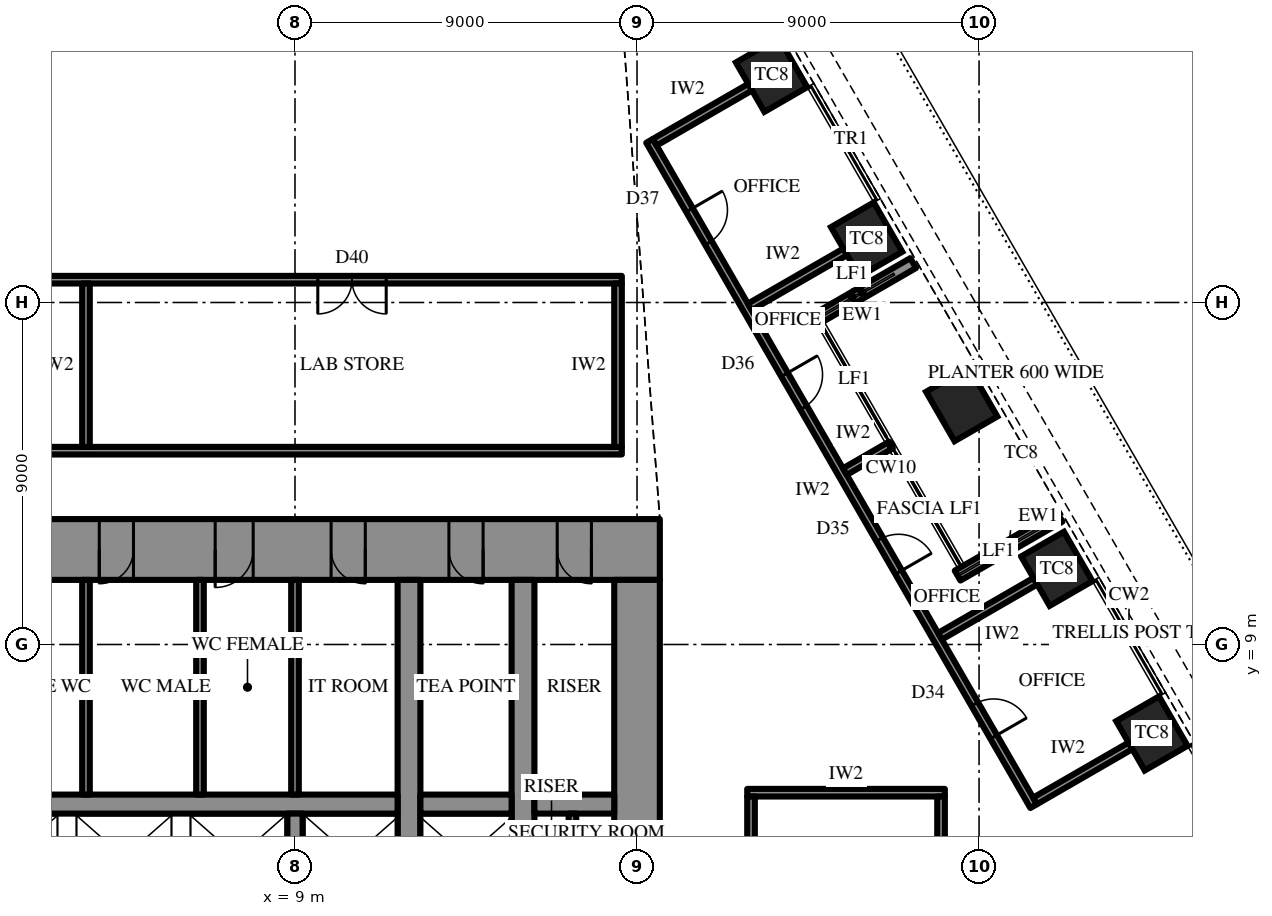
"""IFC4 building model, lengths in metres.
Left out: names, types, materials, properties, quantities, classifications, styles, units other than length and angle.
Written with IfcOpenShell. Run it as: python <this file> out.ifc"""

import sys

from ifc_helpers import new_model, si_unit, direction, frame, frame_2d, origin, origin_2d, place, context, subcontext, project, spatial, rectangle, extrude, element, fill, save


model = new_model("IFC4")
c1 = context("Model", 3, precision=1e-05, world=origin(), true_north=direction((0.0, 1.0)))
c2 = subcontext(c1, "Body", "Model", "MODEL_VIEW")
j1 = project(units=[si_unit("LENGTHUNIT", "METRE"), si_unit("PLANEANGLEUNIT", "RADIAN")], contexts=[c1])
p1 = place(None, origin())
s1 = spatial("IfcSite", under=j1, at=p1, CompositionType="ELEMENT")
p2 = place(p1, origin())
s2 = spatial("IfcBuilding", under=s1, at=p2, CompositionType="ELEMENT")
p3 = place(p2, frame((0.0, 0.0, 195.1)))
s3 = spatial("IfcBuildingStorey", under=s2, at=p3, CompositionType="ELEMENT", Elevation=195.1)
for number, where, z_axis, x_axis in (
    (1, (31.547, 6.658, 0.0), (0.0, 0.0, 1.0), (-0.5, 0.866, 0.0)),
    (2, (29.045, 10.992, 0.0), (0.0, 0.0, 1.0), (-0.5, 0.866, 0.0)),
    (3, (26.544, 15.325, 0.0), (0.0, 0.0, 1.0), (-0.5, 0.866, 0.0)),
    (4, (24.042, 19.658, 0.0), (0.0, 0.0, 1.0), (-0.5, 0.866, 0.0)),
    (5, (21.54, 23.992, 0.0), (0.0, 0.0, 1.0), (-0.5, 0.866, 0.0)),
):
    element("IfcColumn", number, at=place(p3, frame(where, z_axis=z_axis, x_axis=x_axis)), inside=s3, PredefinedType="COLUMN", context=c2, shape_type="SweptSolid", body=[
        extrude(rectangle(XDim=1.5, YDim=1.3, at=origin_2d()), origin(), (0.0, 0.0, 1.0), 4.2),
    ])
p4 = place(p3, frame((-18.6, 11.5, 0.0), z_axis=(0.0, 0.0, 1.0), x_axis=(1.0, 0.0, 0.0)))
e6 = element("IfcWall", 6, at=p4, inside=s3, PredefinedType="SHEAR", context=c2, shape_type="SweptSolid", body=[
    extrude(rectangle(XDim=37.2, YDim=1.6, at=frame_2d((18.6, 0.0))), origin(), (0.0, 0.0, 1.0), 4.2),
])
p5 = place(p4, frame((19.45, 0.0, 0.0)))
e7 = element("IfcOpeningElement", 7, at=p5, cuts=e6, PredefinedType="OPENING", context=c2, shape_type="SweptSolid", body=[
    extrude(rectangle(XDim=0.9, YDim=2.2, at=frame_2d((0.45, 1.1))), frame((0.0, 0.81, 0.0), z_axis=(0.0, -1.0, 0.0), x_axis=(1.0, 0.0, 0.0)), (0.0, 0.0, 1.0), 1.62),
])
p6 = place(p4, frame((22.45, 0.0, 0.0)))
e8 = element("IfcOpeningElement", 8, at=p6, cuts=e6, PredefinedType="OPENING", context=c2, shape_type="SweptSolid", body=[
    extrude(rectangle(XDim=0.9, YDim=2.2, at=frame_2d((0.45, 1.1))), frame((0.0, 0.81, 0.0), z_axis=(0.0, -1.0, 0.0), x_axis=(1.0, 0.0, 0.0)), (0.0, 0.0, 1.0), 1.62),
])
p7 = place(p4, frame((25.5, 0.0, 0.0)))
e9 = element("IfcOpeningElement", 9, at=p7, cuts=e6, PredefinedType="OPENING", context=c2, shape_type="SweptSolid", body=[
    extrude(rectangle(XDim=1.0, YDim=2.2, at=frame_2d((0.5, 1.1))), frame((0.0, 0.81, 0.0), z_axis=(0.0, -1.0, 0.0), x_axis=(1.0, 0.0, 0.0)), (0.0, 0.0, 1.0), 1.62),
])
p8 = place(p4, frame((1.8, 0.0, 0.0)))
e10 = element("IfcOpeningElement", 10, at=p8, cuts=e6, PredefinedType="OPENING", context=c2, shape_type="SweptSolid", body=[
    extrude(rectangle(XDim=0.9, YDim=2.2, at=frame_2d((0.45, 1.1))), frame((0.0, 0.81, 0.0), z_axis=(0.0, -1.0, 0.0), x_axis=(1.0, 0.0, 0.0)), (0.0, 0.0, 1.0), 1.62),
])
p9 = place(p4, frame((4.65, 0.0, 0.0)))
e11 = element("IfcOpeningElement", 11, at=p9, cuts=e6, PredefinedType="OPENING", context=c2, shape_type="SweptSolid", body=[
    extrude(rectangle(XDim=0.9, YDim=2.2, at=frame_2d((0.45, 1.1))), frame((0.0, 0.81, 0.0), z_axis=(0.0, -1.0, 0.0), x_axis=(1.0, 0.0, 0.0)), (0.0, 0.0, 1.0), 1.62),
])
p10 = place(p4, frame((7.75, 0.0, 0.0)))
e12 = element("IfcOpeningElement", 12, at=p10, cuts=e6, PredefinedType="OPENING", context=c2, shape_type="SweptSolid", body=[
    extrude(rectangle(XDim=0.9, YDim=2.2, at=frame_2d((0.45, 1.1))), frame((0.0, 0.81, 0.0), z_axis=(0.0, -1.0, 0.0), x_axis=(1.0, 0.0, 0.0)), (0.0, 0.0, 1.0), 1.62),
])
p11 = place(p4, frame((28.55, 0.0, 0.0)))
e13 = element("IfcOpeningElement", 13, at=p11, cuts=e6, PredefinedType="OPENING", context=c2, shape_type="SweptSolid", body=[
    extrude(rectangle(XDim=0.9, YDim=2.2, at=frame_2d((0.45, 1.1))), frame((0.0, 0.81, 0.0), z_axis=(0.0, -1.0, 0.0), x_axis=(1.0, 0.0, 0.0)), (0.0, 0.0, 1.0), 1.62),
])
p12 = place(p4, frame((31.65, 0.0, 0.0)))
e14 = element("IfcOpeningElement", 14, at=p12, cuts=e6, PredefinedType="OPENING", context=c2, shape_type="SweptSolid", body=[
    extrude(rectangle(XDim=0.9, YDim=2.2, at=frame_2d((0.45, 1.1))), frame((0.0, 0.81, 0.0), z_axis=(0.0, -1.0, 0.0), x_axis=(1.0, 0.0, 0.0)), (0.0, 0.0, 1.0), 1.62),
])
p13 = place(p4, frame((34.5, 0.0, 0.0)))
e15 = element("IfcOpeningElement", 15, at=p13, cuts=e6, PredefinedType="OPENING", context=c2, shape_type="SweptSolid", body=[
    extrude(rectangle(XDim=0.9, YDim=2.2, at=frame_2d((0.45, 1.1))), frame((0.0, 0.81, 0.0), z_axis=(0.0, -1.0, 0.0), x_axis=(1.0, 0.0, 0.0)), (0.0, 0.0, 1.0), 1.62),
])
p14 = place(p3, frame((18.0, -10.7, 0.0), z_axis=(0.0, 0.0, 1.0), x_axis=(0.0, 1.0, 0.0)))
e16 = element("IfcWall", 16, at=p14, inside=s3, PredefinedType="SHEAR", context=c2, shape_type="SweptSolid", body=[
    extrude(rectangle(XDim=21.4, YDim=1.2, at=frame_2d((10.7, 0.0))), origin(), (0.0, 0.0, 1.0), 4.2),
])
p15 = place(p14, frame((9.8, 0.0, 0.0)))
e17 = element("IfcOpeningElement", 17, at=p15, cuts=e16, PredefinedType="OPENING", context=c2, shape_type="SweptSolid", body=[
    extrude(rectangle(XDim=1.8, YDim=2.4, at=frame_2d((0.9, 1.2))), frame((0.0, 0.61, 0.0), z_axis=(0.0, -1.0, 0.0), x_axis=(1.0, 0.0, 0.0)), (0.0, 0.0, 1.0), 1.22),
])
p16 = place(p3, frame((12.0, -10.7, 0.0), z_axis=(0.0, 0.0, 1.0), x_axis=(0.0, 1.0, 0.0)))
e18 = element("IfcWall", 18, at=p16, inside=s3, PredefinedType="SHEAR", context=c2, shape_type="SweptSolid", body=[
    extrude(rectangle(XDim=21.4, YDim=0.6, at=frame_2d((10.7, 0.0))), origin(), (0.0, 0.0, 1.0), 4.2),
])
p17 = place(p16, frame((9.8, 0.0, 0.0)))
e19 = element("IfcOpeningElement", 19, at=p17, cuts=e18, PredefinedType="OPENING", context=c2, shape_type="SweptSolid", body=[
    extrude(rectangle(XDim=1.8, YDim=2.4, at=frame_2d((0.9, 1.2))), frame((0.0, 0.31, 0.0), z_axis=(0.0, -1.0, 0.0), x_axis=(1.0, 0.0, 0.0)), (0.0, 0.0, 1.0), 0.62),
])
p18 = place(p3, frame((15.0, -10.7, 0.0), z_axis=(0.0, 0.0, 1.0), x_axis=(0.0, 1.0, 0.0)))
e20 = element("IfcWall", 20, at=p18, inside=s3, PredefinedType="SHEAR", context=c2, shape_type="SweptSolid", body=[
    extrude(rectangle(XDim=21.4, YDim=0.6, at=frame_2d((10.7, 0.0))), origin(), (0.0, 0.0, 1.0), 4.2),
])
p19 = place(p18, frame((9.8, 0.0, 0.0)))
e21 = element("IfcOpeningElement", 21, at=p19, cuts=e20, PredefinedType="OPENING", context=c2, shape_type="SweptSolid", body=[
    extrude(rectangle(XDim=1.8, YDim=2.4, at=frame_2d((0.9, 1.2))), frame((0.0, 0.31, 0.0), z_axis=(0.0, -1.0, 0.0), x_axis=(1.0, 0.0, 0.0)), (0.0, 0.0, 1.0), 0.62),
])
p20 = place(p3, frame((-11.7, 4.8, 0.0), z_axis=(0.0, 0.0, 1.0), x_axis=(1.0, 0.0, 0.0)))
e22 = element("IfcWall", 22, at=p20, inside=s3, PredefinedType="SHEAR", context=c2, shape_type="SweptSolid", body=[
    extrude(rectangle(XDim=23.4, YDim=0.5, at=frame_2d((11.7, 0.0))), origin(), (0.0, 0.0, 1.0), 4.2),
])
p21 = place(p20, frame((6.6, 0.0, 0.0)))
e23 = element("IfcOpeningElement", 23, at=p21, cuts=e22, PredefinedType="OPENING", context=c2, shape_type="SweptSolid", body=[
    extrude(rectangle(XDim=1.2, YDim=2.2, at=frame_2d((0.6, 1.1))), frame((0.0, 0.26, 0.0), z_axis=(0.0, -1.0, 0.0), x_axis=(1.0, 0.0, 0.0)), (0.0, 0.0, 1.0), 0.52),
])
p22 = place(p20, frame((3.6, 0.0, 0.0)))
e24 = element("IfcOpeningElement", 24, at=p22, cuts=e22, PredefinedType="OPENING", context=c2, shape_type="SweptSolid", body=[
    extrude(rectangle(XDim=1.2, YDim=2.2, at=frame_2d((0.6, 1.1))), frame((0.0, 0.26, 0.0), z_axis=(0.0, -1.0, 0.0), x_axis=(1.0, 0.0, 0.0)), (0.0, 0.0, 1.0), 0.52),
])
p23 = place(p3, frame((12.3, 4.8, 0.0), z_axis=(0.0, 0.0, 1.0), x_axis=(1.0, 0.0, 0.0)))
e25 = element("IfcWall", 25, at=p23, inside=s3, PredefinedType="SHEAR", context=c2, shape_type="SweptSolid", body=[
    extrude(rectangle(XDim=2.4, YDim=0.5, at=frame_2d((1.2, 0.0))), origin(), (0.0, 0.0, 1.0), 4.2),
])
p24 = place(p3, frame((15.3, 4.8, 0.0), z_axis=(0.0, 0.0, 1.0), x_axis=(1.0, 0.0, 0.0)))
e26 = element("IfcWall", 26, at=p24, inside=s3, PredefinedType="SHEAR", context=c2, shape_type="SweptSolid", body=[
    extrude(rectangle(XDim=2.1, YDim=0.5, at=frame_2d((1.05, 0.0))), origin(), (0.0, 0.0, 1.0), 4.2),
])
p25 = place(p3, frame((9.0, 2.25, 0.0), z_axis=(0.0, 0.0, 1.0), x_axis=(0.0, 1.0, 0.0)))
e27 = element("IfcWall", 27, at=p25, inside=s3, PredefinedType="SHEAR", context=c2, shape_type="SweptSolid", body=[
    extrude(rectangle(XDim=2.3, YDim=0.4, at=frame_2d((1.15, 0.0))), origin(), (0.0, 0.0, 1.0), 4.2),
])
p26 = place(p3, frame((29.12, 12.363, 0.0), z_axis=(0.0, 0.0, 1.0), x_axis=(-0.86602952684, -0.49999285859, 0.0)))
e28 = element("IfcWall", 28, at=p26, inside=s3, PredefinedType="SOLIDWALL", context=c2, shape_type="SweptSolid", body=[
    extrude(rectangle(XDim=3.1, YDim=0.3, at=frame_2d((1.55, 0.0))), origin(), (0.0, 0.0, 1.0), 2.75),
])
p27 = place(p3, frame((25.266, 19.037, 0.0), z_axis=(0.0, 0.0, 1.0), x_axis=(-0.86600983753, -0.500026960575, 0.0)))
e29 = element("IfcWall", 29, at=p27, inside=s3, PredefinedType="SOLIDWALL", context=c2, shape_type="SweptSolid", body=[
    extrude(rectangle(XDim=3.1, YDim=0.3, at=frame_2d((1.55, 0.0))), origin(), (0.0, 0.0, 1.0), 2.75),
])
for number, where, z_axis, x_axis in (
    (30, (9.0, 5.05, 0.0), (0.0, 0.0, 1.0), (0.0, 1.0, 0.0)),
    (31, (3.5, 5.05, 0.0), (0.0, 0.0, 1.0), (0.0, 1.0, 0.0)),
    (32, (6.5, 5.05, 0.0), (0.0, 0.0, 1.0), (0.0, 1.0, 0.0)),
):
    element("IfcWall", number, at=place(p3, frame(where, z_axis=z_axis, x_axis=x_axis)), inside=s3, PredefinedType="PARTITIONING", context=c2, shape_type="SweptSolid", body=[
        extrude(rectangle(XDim=5.65, YDim=0.2, at=frame_2d((2.825, 0.0))), origin(), (0.0, 0.0, 1.0), 4.0),
    ])
p28 = place(p3, frame((16.3, 3.55, 0.0), z_axis=(0.0, 0.0, 1.0), x_axis=(0.0, 1.0, 0.0)))
e33 = element("IfcWall", 33, at=p28, inside=s3, PredefinedType="PARTITIONING", context=c2, shape_type="SweptSolid", body=[
    extrude(rectangle(XDim=1.0, YDim=0.2, at=frame_2d((0.5, 0.0))), origin(), (0.0, 0.0, 1.0), 4.0),
])
p29 = place(p3, frame((-17.6, 14.1, 0.0), z_axis=(0.0, 0.0, 1.0), x_axis=(1.0, 0.0, 0.0)))
e34 = element("IfcWall", 34, at=p29, inside=s3, PredefinedType="PARTITIONING", context=c2, shape_type="SweptSolid", body=[
    extrude(rectangle(XDim=35.2, YDim=0.2, at=frame_2d((17.6, 0.0))), origin(), (0.0, 0.0, 1.0), 4.0),
])
p30 = place(p3, frame((-17.6, 18.6, 0.0), z_axis=(0.0, 0.0, 1.0), x_axis=(1.0, 0.0, 0.0)))
e35 = element("IfcWall", 35, at=p30, inside=s3, PredefinedType="PARTITIONING", context=c2, shape_type="SweptSolid", body=[
    extrude(rectangle(XDim=35.2, YDim=0.2, at=frame_2d((17.6, 0.0))), origin(), (0.0, 0.0, 1.0), 4.0),
])
p31 = place(p30, frame((9.7, 0.0, 0.0)))
e36 = element("IfcOpeningElement", 36, at=p31, cuts=e35, PredefinedType="OPENING", context=c2, shape_type="SweptSolid", body=[
    extrude(rectangle(XDim=1.8, YDim=2.4, at=frame_2d((0.9, 1.2))), frame((0.0, 0.11, 0.0), z_axis=(0.0, -1.0, 0.0), x_axis=(1.0, 0.0, 0.0)), (0.0, 0.0, 1.0), 0.22),
])
p32 = place(p30, frame((27.2, 0.0, 0.0)))
e37 = element("IfcOpeningElement", 37, at=p32, cuts=e35, PredefinedType="OPENING", context=c2, shape_type="SweptSolid", body=[
    extrude(rectangle(XDim=1.8, YDim=2.4, at=frame_2d((0.9, 1.2))), frame((0.0, 0.11, 0.0), z_axis=(0.0, -1.0, 0.0), x_axis=(1.0, 0.0, 0.0)), (0.0, 0.0, 1.0), 0.22),
])
for number, where, z_axis, x_axis in (
    (38, (3.5, 14.2, 0.0), (0.0, 0.0, 1.0), (0.0, 1.0, 0.0)),
    (39, (17.5, 14.2, 0.0), (0.0, 0.0, 1.0), (0.0, 1.0, 0.0)),
):
    element("IfcWall", number, at=place(p3, frame(where, z_axis=z_axis, x_axis=x_axis)), inside=s3, PredefinedType="PARTITIONING", context=c2, shape_type="SweptSolid", body=[
        extrude(rectangle(XDim=4.3, YDim=0.2, at=frame_2d((2.15, 0.0))), origin(), (0.0, 0.0, 1.0), 4.0),
    ])
p33 = place(p3, frame((28.436, 4.747, 0.0), z_axis=(0.0, 0.0, 1.0), x_axis=(-0.499995666571, 0.866027905677, 0.0)))
e40 = element("IfcWall", 40, at=p33, inside=s3, PredefinedType="PARTITIONING", context=c2, shape_type="SweptSolid", body=[
    extrude(rectangle(XDim=20.215, YDim=0.2, at=frame_2d((10.107, 0.0))), origin(), (0.0, 0.0, 1.0), 4.0),
])
p34 = place(p33, frame((2.102, 0.0, 0.0)))
e41 = element("IfcOpeningElement", 41, at=p34, cuts=e40, PredefinedType="OPENING", context=c2, shape_type="SweptSolid", body=[
    extrude(rectangle(XDim=1.0, YDim=2.2, at=frame_2d((0.5, 1.1))), frame((0.0, 0.11, 0.0), z_axis=(0.0, -1.0, 0.0), x_axis=(1.0, 0.0, 0.0)), (0.0, 0.0, 1.0), 0.22),
])
p35 = place(p33, frame((7.105, 0.0, 0.0)))
e42 = element("IfcOpeningElement", 42, at=p35, cuts=e40, PredefinedType="OPENING", context=c2, shape_type="SweptSolid", body=[
    extrude(rectangle(XDim=1.0, YDim=2.2, at=frame_2d((0.5, 1.1))), frame((0.0, 0.11, 0.0), z_axis=(0.0, -1.0, 0.0), x_axis=(1.0, 0.0, 0.0)), (0.0, 0.0, 1.0), 0.22),
])
p36 = place(p33, frame((12.109, 0.0, 0.0)))
e43 = element("IfcOpeningElement", 43, at=p36, cuts=e40, PredefinedType="OPENING", context=c2, shape_type="SweptSolid", body=[
    extrude(rectangle(XDim=1.0, YDim=2.2, at=frame_2d((0.5, 1.1))), frame((0.0, 0.11, 0.0), z_axis=(0.0, -1.0, 0.0), x_axis=(1.0, 0.0, 0.0)), (0.0, 0.0, 1.0), 0.22),
])
p37 = place(p33, frame((17.113, 0.0, 0.0)))
e44 = element("IfcOpeningElement", 44, at=p37, cuts=e40, PredefinedType="OPENING", context=c2, shape_type="SweptSolid", body=[
    extrude(rectangle(XDim=1.0, YDim=2.2, at=frame_2d((0.5, 1.1))), frame((0.0, 0.11, 0.0), z_axis=(0.0, -1.0, 0.0), x_axis=(1.0, 0.0, 0.0)), (0.0, 0.0, 1.0), 0.22),
])
p38 = place(p3, frame((28.473, 4.883, 0.0), z_axis=(0.0, 0.0, 1.0), x_axis=(0.866032775405, 0.499987231761, 0.0)))
e45 = element("IfcWall", 45, at=p38, inside=s3, PredefinedType="PARTITIONING", context=c2, shape_type="SweptSolid", body=[
    extrude(rectangle(XDim=2.9, YDim=0.2, at=frame_2d((1.45, 0.0))), origin(), (0.0, 0.0, 1.0), 3.082),
])
p39 = place(p3, frame((25.971, 9.217, 0.0), z_axis=(0.0, 0.0, 1.0), x_axis=(0.865996321171, 0.50005036918, 0.0)))
e46 = element("IfcWall", 46, at=p39, inside=s3, PredefinedType="PARTITIONING", context=c2, shape_type="SweptSolid", body=[
    extrude(rectangle(XDim=2.9, YDim=0.2, at=frame_2d((1.45, 0.0))), origin(), (0.0, 0.0, 1.0), 3.082),
])
p40 = place(p3, frame((23.469, 13.55, 0.0), z_axis=(0.0, 0.0, 1.0), x_axis=(0.866057911062, 0.499943691516, 0.0)))
e47 = element("IfcWall", 47, at=p40, inside=s3, PredefinedType="PARTITIONING", context=c2, shape_type="SweptSolid", body=[
    extrude(rectangle(XDim=1.401, YDim=0.2, at=frame_2d((0.701, 0.0))), origin(), (0.0, 0.0, 1.0), 4.0),
])
p41 = place(p3, frame((20.968, 17.883, 0.0), z_axis=(0.0, 0.0, 1.0), x_axis=(0.866032775405, 0.499987231761, 0.0)))
e48 = element("IfcWall", 48, at=p41, inside=s3, PredefinedType="PARTITIONING", context=c2, shape_type="SweptSolid", body=[
    extrude(rectangle(XDim=2.9, YDim=0.2, at=frame_2d((1.45, 0.0))), origin(), (0.0, 0.0, 1.0), 3.082),
])
p42 = place(p3, frame((18.466, 22.217, 0.0), z_axis=(0.0, 0.0, 1.0), x_axis=(0.865996321171, 0.50005036918, 0.0)))
e49 = element("IfcWall", 49, at=p42, inside=s3, PredefinedType="PARTITIONING", context=c2, shape_type="SweptSolid", body=[
    extrude(rectangle(XDim=2.9, YDim=0.2, at=frame_2d((1.45, 0.0))), origin(), (0.0, 0.0, 1.0), 3.082),
])
p43 = place(p3, frame((20.9, 5.1, 0.0), z_axis=(0.0, 0.0, 1.0), x_axis=(1.0, 0.0, 0.0)))
e50 = element("IfcWall", 50, at=p43, inside=s3, PredefinedType="PARTITIONING", context=c2, shape_type="SweptSolid", body=[
    extrude(rectangle(XDim=5.2, YDim=0.2, at=frame_2d((2.6, 0.0))), origin(), (0.0, 0.0, 1.0), 4.0),
])
for number, where, z_axis, x_axis in (
    (51, (21.0, 1.7, 0.0), (0.0, 0.0, 1.0), (0.0, 1.0, 0.0)),
    (52, (26.0, 1.7, 0.0), (0.0, 0.0, 1.0), (0.0, 1.0, 0.0)),
):
    element("IfcWall", number, at=place(p3, frame(where, z_axis=z_axis, x_axis=x_axis)), inside=s3, PredefinedType="PARTITIONING", context=c2, shape_type="SweptSolid", body=[
        extrude(rectangle(XDim=3.3, YDim=0.2, at=frame_2d((1.65, 0.0))), origin(), (0.0, 0.0, 1.0), 4.0),
    ])
p44 = place(p6, frame((0.9, 0.0, 0.0), z_axis=(0.0, 0.0, 1.0), x_axis=(-1.0, 0.0, 0.0)))
e53 = element("IfcDoor", 53, at=p44, inside=s3, OperationType="SINGLE_SWING_LEFT", PredefinedType="DOOR", context=c2, shape_type="SweptSolid", body=[
    extrude(rectangle(XDim=0.9, YDim=2.2, at=frame_2d((0.45, 1.1))), frame((0.0, 0.025, 0.0), z_axis=(0.0, -1.0, 0.0), x_axis=(1.0, 0.0, 0.0)), (0.0, 0.0, 1.0), 0.05),
])
fill(e8, e53)
p45 = place(p7, frame((1.0, 0.0, 0.0), z_axis=(0.0, 0.0, 1.0), x_axis=(-1.0, 0.0, 0.0)))
e54 = element("IfcDoor", 54, at=p45, inside=s3, OperationType="SINGLE_SWING_LEFT", PredefinedType="DOOR", context=c2, shape_type="SweptSolid", body=[
    extrude(rectangle(XDim=1.0, YDim=2.2, at=frame_2d((0.5, 1.1))), frame((0.0, 0.025, 0.0), z_axis=(0.0, -1.0, 0.0), x_axis=(1.0, 0.0, 0.0)), (0.0, 0.0, 1.0), 0.05),
])
fill(e9, e54)
p46 = place(p11, frame((0.9, 0.0, 0.0), z_axis=(0.0, 0.0, 1.0), x_axis=(-1.0, 0.0, 0.0)))
e55 = element("IfcDoor", 55, at=p46, inside=s3, OperationType="SINGLE_SWING_RIGHT", PredefinedType="DOOR", context=c2, shape_type="SweptSolid", body=[
    extrude(rectangle(XDim=0.9, YDim=2.2, at=frame_2d((0.45, 1.1))), frame((0.0, 0.025, 0.0), z_axis=(0.0, -1.0, 0.0), x_axis=(1.0, 0.0, 0.0)), (0.0, 0.0, 1.0), 0.05),
])
fill(e13, e55)
p47 = place(p12, frame((0.9, 0.0, 0.0), z_axis=(0.0, 0.0, 1.0), x_axis=(-1.0, 0.0, 0.0)))
e56 = element("IfcDoor", 56, at=p47, inside=s3, OperationType="SINGLE_SWING_RIGHT", PredefinedType="DOOR", context=c2, shape_type="SweptSolid", body=[
    extrude(rectangle(XDim=0.9, YDim=2.2, at=frame_2d((0.45, 1.1))), frame((0.0, 0.025, 0.0), z_axis=(0.0, -1.0, 0.0), x_axis=(1.0, 0.0, 0.0)), (0.0, 0.0, 1.0), 0.05),
])
fill(e14, e56)
p48 = place(p13, frame((0.9, 0.0, 0.0), z_axis=(0.0, 0.0, 1.0), x_axis=(-1.0, 0.0, 0.0)))
e57 = element("IfcDoor", 57, at=p48, inside=s3, OperationType="SINGLE_SWING_RIGHT", PredefinedType="DOOR", context=c2, shape_type="SweptSolid", body=[
    extrude(rectangle(XDim=0.9, YDim=2.2, at=frame_2d((0.45, 1.1))), frame((0.0, 0.025, 0.0), z_axis=(0.0, -1.0, 0.0), x_axis=(1.0, 0.0, 0.0)), (0.0, 0.0, 1.0), 0.05),
])
fill(e15, e57)
p49 = place(p32, frame((1.8, 0.0, 0.0), z_axis=(0.0, 0.0, 1.0), x_axis=(-1.0, 0.0, 0.0)))
e58 = element("IfcDoor", 58, at=p49, inside=s3, OperationType="DOUBLE_DOOR_SINGLE_SWING", PredefinedType="DOOR", context=c2, shape_type="SweptSolid", body=[
    extrude(rectangle(XDim=1.8, YDim=2.4, at=frame_2d((0.9, 1.2))), frame((0.0, 0.025, 0.0), z_axis=(0.0, -1.0, 0.0), x_axis=(1.0, 0.0, 0.0)), (0.0, 0.0, 1.0), 0.05),
])
fill(e37, e58)
p50 = place(p34, frame((1.0, 0.0, 0.0), z_axis=(0.0, 0.0, 1.0), x_axis=(-1.0, 0.0, 0.0)))
e59 = element("IfcDoor", 59, at=p50, inside=s3, OperationType="SINGLE_SWING_LEFT", PredefinedType="DOOR", context=c2, shape_type="SweptSolid", body=[
    extrude(rectangle(XDim=1.0, YDim=2.2, at=frame_2d((0.5, 1.1))), frame((0.0, 0.025, 0.0), z_axis=(0.0, -1.0, 0.0), x_axis=(1.0, 0.0, 0.0)), (0.0, 0.0, 1.0), 0.05),
])
fill(e41, e59)
p51 = place(p35, frame((1.0, 0.0, 0.0), z_axis=(0.0, 0.0, 1.0), x_axis=(-1.0, 0.0, 0.0)))
e60 = element("IfcDoor", 60, at=p51, inside=s3, OperationType="SINGLE_SWING_LEFT", PredefinedType="DOOR", context=c2, shape_type="SweptSolid", body=[
    extrude(rectangle(XDim=1.0, YDim=2.2, at=frame_2d((0.5, 1.1))), frame((0.0, 0.025, 0.0), z_axis=(0.0, -1.0, 0.0), x_axis=(1.0, 0.0, 0.0)), (0.0, 0.0, 1.0), 0.05),
])
fill(e42, e60)
p52 = place(p36, frame((1.0, 0.0, 0.0), z_axis=(0.0, 0.0, 1.0), x_axis=(-1.0, 0.0, 0.0)))
e61 = element("IfcDoor", 61, at=p52, inside=s3, OperationType="SINGLE_SWING_RIGHT", PredefinedType="DOOR", context=c2, shape_type="SweptSolid", body=[
    extrude(rectangle(XDim=1.0, YDim=2.2, at=frame_2d((0.5, 1.1))), frame((0.0, 0.025, 0.0), z_axis=(0.0, -1.0, 0.0), x_axis=(1.0, 0.0, 0.0)), (0.0, 0.0, 1.0), 0.05),
])
fill(e43, e61)
p53 = place(p37, frame((1.0, 0.0, 0.0), z_axis=(0.0, 0.0, 1.0), x_axis=(-1.0, 0.0, 0.0)))
e62 = element("IfcDoor", 62, at=p53, inside=s3, OperationType="SINGLE_SWING_RIGHT", PredefinedType="DOOR", context=c2, shape_type="SweptSolid", body=[
    extrude(rectangle(XDim=1.0, YDim=2.2, at=frame_2d((0.5, 1.1))), frame((0.0, 0.025, 0.0), z_axis=(0.0, -1.0, 0.0), x_axis=(1.0, 0.0, 0.0)), (0.0, 0.0, 1.0), 0.05),
])
fill(e44, e62)
save(model, sys.argv[1])
